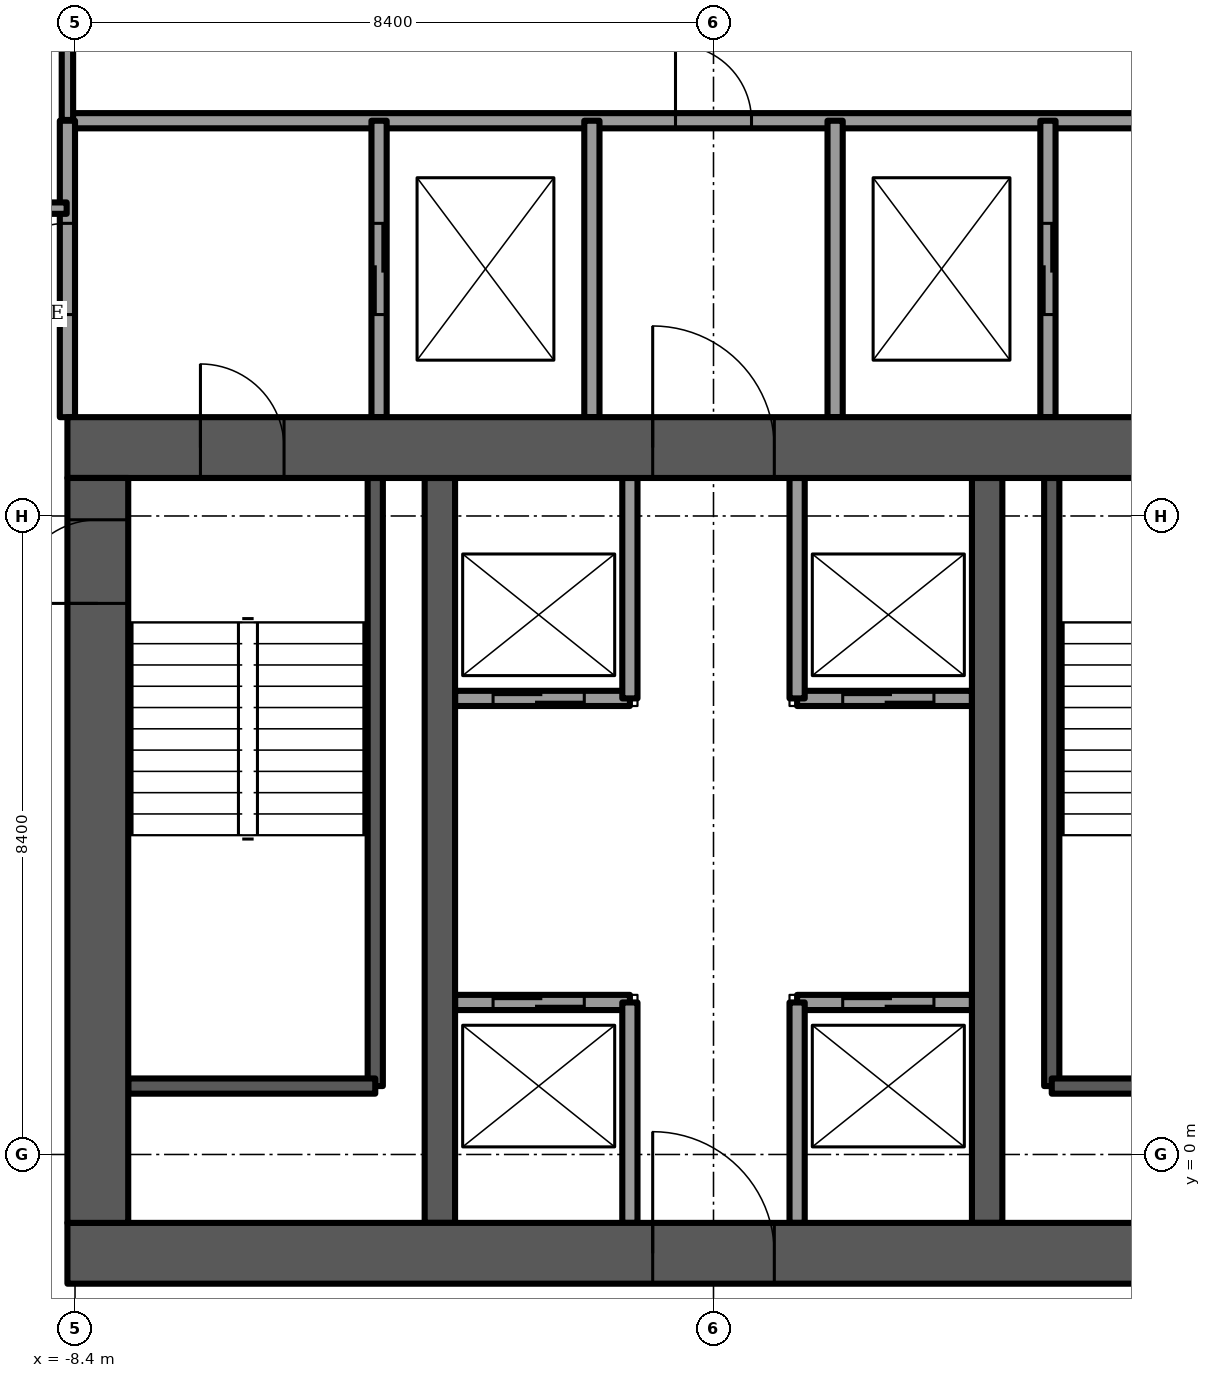
"""IFC4 building model, lengths in metres.
Left out: names, types, materials, properties, quantities, classifications, styles, units other than length and angle.
Written with IfcOpenShell. Run it as: python <this file> out.ifc"""

import sys

from ifc_helpers import new_model, si_unit, direction, frame, frame_2d, origin, place, context, subcontext, project, spatial, rectangle, extrude, element, fill, save


model = new_model("IFC4")
c1 = context("Model", 3, precision=1e-05, world=origin(), true_north=direction((0.0, 1.0)))
c2 = subcontext(c1, "Body", "Model", "MODEL_VIEW")
j1 = project(units=[si_unit("LENGTHUNIT", "METRE"), si_unit("PLANEANGLEUNIT", "RADIAN")], contexts=[c1])
p1 = place(None, origin())
s1 = spatial("IfcSite", under=j1, at=p1, CompositionType="ELEMENT")
p2 = place(p1, origin())
s2 = spatial("IfcBuilding", under=s1, at=p2, CompositionType="ELEMENT")
p3 = place(p2, frame((0.0, 0.0, 168.25)))
s3 = spatial("IfcBuildingStorey", under=s2, at=p3, CompositionType="ELEMENT", Elevation=168.25)
p4 = place(p3, frame((-8.5, -1.3, -0.3), z_axis=(0.0, 0.0, 1.0), x_axis=(1.0, 0.0, 0.0)))
e1 = element("IfcWall", 1, at=p4, inside=s3, PredefinedType="SHEAR", context=c2, shape_type="SweptSolid", body=[
    extrude(rectangle(XDim=17.0, YDim=0.8, at=frame_2d((8.5, 0.0))), origin(), (0.0, 0.0, 1.0), 3.75),
])
p5 = place(p4, frame((7.7, 0.0, 0.0)))
e2 = element("IfcOpeningElement", 2, at=p5, cuts=e1, PredefinedType="OPENING", context=c2, shape_type="SweptSolid", body=[
    extrude(rectangle(XDim=1.6, YDim=2.1, at=frame_2d((0.8, 1.05))), frame((0.0, 0.4, 0.0), z_axis=(0.0, -1.0, 0.0), x_axis=(1.0, 0.0, 0.0)), (0.0, 0.0, 1.0), 0.8),
])
p6 = place(p3, frame((-8.5, 9.3, -0.3), z_axis=(0.0, 0.0, 1.0), x_axis=(1.0, 0.0, 0.0)))
e3 = element("IfcWall", 3, at=p6, inside=s3, PredefinedType="SHEAR", context=c2, shape_type="SweptSolid", body=[
    extrude(rectangle(XDim=17.0, YDim=0.8, at=frame_2d((8.5, 0.0))), origin(), (0.0, 0.0, 1.0), 3.75),
])
p7 = place(p6, frame((7.7, 0.0, 0.0)))
e4 = element("IfcOpeningElement", 4, at=p7, cuts=e3, PredefinedType="OPENING", context=c2, shape_type="SweptSolid", body=[
    extrude(rectangle(XDim=1.6, YDim=2.1, at=frame_2d((0.8, 1.05))), frame((0.0, 0.4, 0.0), z_axis=(0.0, -1.0, 0.0), x_axis=(1.0, 0.0, 0.0)), (0.0, 0.0, 1.0), 0.8),
])
p8 = place(p6, frame((1.75, 0.0, 0.0)))
e5 = element("IfcOpeningElement", 5, at=p8, cuts=e3, PredefinedType="OPENING", context=c2, shape_type="SweptSolid", body=[
    extrude(rectangle(XDim=1.1, YDim=2.1, at=frame_2d((0.55, 1.05))), frame((0.0, 0.4, 0.0), z_axis=(0.0, -1.0, 0.0), x_axis=(1.0, 0.0, 0.0)), (0.0, 0.0, 1.0), 0.8),
])
p9 = place(p6, frame((14.15, 0.0, 0.0)))
e6 = element("IfcOpeningElement", 6, at=p9, cuts=e3, PredefinedType="OPENING", context=c2, shape_type="SweptSolid", body=[
    extrude(rectangle(XDim=1.1, YDim=2.1, at=frame_2d((0.55, 1.05))), frame((0.0, 0.4, 0.0), z_axis=(0.0, -1.0, 0.0), x_axis=(1.0, 0.0, 0.0)), (0.0, 0.0, 1.0), 0.8),
])
p10 = place(p3, frame((-8.1, -0.9, -0.3), z_axis=(0.0, 0.0, 1.0), x_axis=(0.0, 1.0, 0.0)))
e7 = element("IfcWall", 7, at=p10, inside=s3, PredefinedType="SHEAR", context=c2, shape_type="SweptSolid", body=[
    extrude(rectangle(XDim=9.8, YDim=0.8, at=frame_2d((4.9, 0.0))), origin(), (0.0, 0.0, 1.0), 3.75),
])
p11 = place(p10, frame((8.15, 0.0, 0.0)))
e8 = element("IfcOpeningElement", 8, at=p11, cuts=e7, PredefinedType="OPENING", context=c2, shape_type="SweptSolid", body=[
    extrude(rectangle(XDim=1.1, YDim=2.1, at=frame_2d((0.55, 1.05))), frame((0.0, 0.4, 0.0), z_axis=(0.0, -1.0, 0.0), x_axis=(1.0, 0.0, 0.0)), (0.0, 0.0, 1.0), 0.8),
])
for number, where, z_axis, x_axis in (
    (9, (-3.6, -0.9, -0.3), (0.0, 0.0, 1.0), (0.0, 1.0, 0.0)),
    (10, (3.6, -0.9, -0.3), (0.0, 0.0, 1.0), (0.0, 1.0, 0.0)),
):
    element("IfcWall", number, at=place(p3, frame(where, z_axis=z_axis, x_axis=x_axis)), inside=s3, PredefinedType="SHEAR", context=c2, shape_type="SweptSolid", body=[
        extrude(rectangle(XDim=9.8, YDim=0.4, at=frame_2d((4.9, 0.0))), origin(), (0.0, 0.0, 1.0), 3.75),
    ])
p12 = place(p3, frame((-7.393, 17.292, 0.0), z_axis=(0.0, 0.0, 1.0), x_axis=(-0.500001917853, -0.866024296509, 0.0)))
e11 = element("IfcWall", 11, at=p12, inside=s3, PredefinedType="SOLIDWALL", context=c2, shape_type="SweptSolid", body=[
    extrude(rectangle(XDim=19.788, YDim=0.15, at=frame_2d((9.894, 0.0))), origin(), (0.0, 0.0, 1.0), 3.45),
])
p13 = place(p12, frame((3.868, 0.0, 0.15)))
e12 = element("IfcOpeningElement", 12, at=p13, cuts=e11, PredefinedType="OPENING", context=c2, shape_type="SweptSolid", body=[
    extrude(rectangle(XDim=1.4, YDim=2.85, at=frame_2d((0.7, 1.425))), frame((0.0, 0.075, 0.0), z_axis=(0.0, -1.0, 0.0), x_axis=(1.0, 0.0, 0.0)), (0.0, 0.0, 1.0), 0.15),
])
p14 = place(p12, frame((10.067, 0.0, 0.15)))
e13 = element("IfcOpeningElement", 13, at=p14, cuts=e11, PredefinedType="OPENING", context=c2, shape_type="SweptSolid", body=[
    extrude(rectangle(XDim=0.9, YDim=2.85, at=frame_2d((0.45, 1.425))), frame((0.0, 0.075, 0.0), z_axis=(0.0, -1.0, 0.0), x_axis=(1.0, 0.0, 0.0)), (0.0, 0.0, 1.0), 0.15),
])
p15 = place(p12, frame((7.967, 0.0, 0.15)))
e14 = element("IfcOpeningElement", 14, at=p15, cuts=e11, PredefinedType="OPENING", context=c2, shape_type="SweptSolid", body=[
    extrude(rectangle(XDim=1.4, YDim=2.85, at=frame_2d((0.7, 1.425))), frame((0.0, 0.075, 0.0), z_axis=(0.0, -1.0, 0.0), x_axis=(1.0, 0.0, 0.0)), (0.0, 0.0, 1.0), 0.15),
])
p16 = place(p12, frame((13.779, 0.0, 0.0)))
e15 = element("IfcOpeningElement", 15, at=p16, cuts=e11, PredefinedType="OPENING", context=c2, shape_type="SweptSolid", body=[
    extrude(rectangle(XDim=1.4, YDim=2.4, at=frame_2d((0.7, 1.2))), frame((0.0, 0.075, 0.0), z_axis=(0.0, -1.0, 0.0), x_axis=(1.0, 0.0, 0.0)), (0.0, 0.0, 1.0), 0.15),
])
p17 = place(p12, frame((17.979, 0.0, 0.0)))
e16 = element("IfcOpeningElement", 16, at=p17, cuts=e11, PredefinedType="OPENING", context=c2, shape_type="SweptSolid", body=[
    extrude(rectangle(XDim=1.4, YDim=2.4, at=frame_2d((0.7, 1.2))), frame((0.0, 0.075, 0.0), z_axis=(0.0, -1.0, 0.0), x_axis=(1.0, 0.0, 0.0)), (0.0, 0.0, 1.0), 0.15),
])
p18 = place(p12, frame((0.168, 0.0, 0.15)))
e17 = element("IfcOpeningElement", 17, at=p18, cuts=e11, PredefinedType="OPENING", context=c2, shape_type="SweptSolid", body=[
    extrude(rectangle(XDim=1.6, YDim=2.73, at=frame_2d((0.8, 1.365))), frame((0.0, 0.075, 0.0), z_axis=(0.0, -1.0, 0.0), x_axis=(1.0, 0.0, 0.0)), (0.0, 0.0, 1.0), 0.15),
])
p19 = place(p3, frame((-3.4, 2.0, 0.0), z_axis=(0.0, 0.0, 1.0), x_axis=(1.0, 0.0, 0.0)))
e18 = element("IfcWall", 18, at=p19, inside=s3, PredefinedType="PARTITIONING", context=c2, shape_type="SweptSolid", body=[
    extrude(rectangle(XDim=2.3, YDim=0.2, at=frame_2d((1.15, 0.0))), origin(), (0.0, 0.0, 1.0), 3.45),
])
p20 = place(p19, frame((0.5, 0.0, 0.0)))
e19 = element("IfcOpeningElement", 19, at=p20, cuts=e18, PredefinedType="OPENING", context=c2, shape_type="SweptSolid", body=[
    extrude(rectangle(XDim=1.2, YDim=2.1, at=frame_2d((0.6, 1.05))), frame((0.0, 0.1, 0.0), z_axis=(0.0, -1.0, 0.0), x_axis=(1.0, 0.0, 0.0)), (0.0, 0.0, 1.0), 0.2),
])
p21 = place(p3, frame((-3.4, 6.0, 0.0), z_axis=(0.0, 0.0, 1.0), x_axis=(1.0, 0.0, 0.0)))
e20 = element("IfcWall", 20, at=p21, inside=s3, PredefinedType="PARTITIONING", context=c2, shape_type="SweptSolid", body=[
    extrude(rectangle(XDim=2.3, YDim=0.2, at=frame_2d((1.15, 0.0))), origin(), (0.0, 0.0, 1.0), 3.45),
])
p22 = place(p21, frame((0.5, 0.0, 0.0)))
e21 = element("IfcOpeningElement", 21, at=p22, cuts=e20, PredefinedType="OPENING", context=c2, shape_type="SweptSolid", body=[
    extrude(rectangle(XDim=1.2, YDim=2.1, at=frame_2d((0.6, 1.05))), frame((0.0, 0.1, 0.0), z_axis=(0.0, -1.0, 0.0), x_axis=(1.0, 0.0, 0.0)), (0.0, 0.0, 1.0), 0.2),
])
p23 = place(p3, frame((1.1, 2.0, 0.0), z_axis=(0.0, 0.0, 1.0), x_axis=(1.0, 0.0, 0.0)))
e22 = element("IfcWall", 22, at=p23, inside=s3, PredefinedType="PARTITIONING", context=c2, shape_type="SweptSolid", body=[
    extrude(rectangle(XDim=2.3, YDim=0.2, at=frame_2d((1.15, 0.0))), origin(), (0.0, 0.0, 1.0), 3.45),
])
p24 = place(p23, frame((0.6, 0.0, 0.0)))
e23 = element("IfcOpeningElement", 23, at=p24, cuts=e22, PredefinedType="OPENING", context=c2, shape_type="SweptSolid", body=[
    extrude(rectangle(XDim=1.2, YDim=2.1, at=frame_2d((0.6, 1.05))), frame((0.0, 0.1, 0.0), z_axis=(0.0, -1.0, 0.0), x_axis=(1.0, 0.0, 0.0)), (0.0, 0.0, 1.0), 0.2),
])
p25 = place(p3, frame((1.1, 6.0, 0.0), z_axis=(0.0, 0.0, 1.0), x_axis=(1.0, 0.0, 0.0)))
e24 = element("IfcWall", 24, at=p25, inside=s3, PredefinedType="PARTITIONING", context=c2, shape_type="SweptSolid", body=[
    extrude(rectangle(XDim=2.3, YDim=0.2, at=frame_2d((1.15, 0.0))), origin(), (0.0, 0.0, 1.0), 3.45),
])
p26 = place(p25, frame((0.6, 0.0, 0.0)))
e25 = element("IfcOpeningElement", 25, at=p26, cuts=e24, PredefinedType="OPENING", context=c2, shape_type="SweptSolid", body=[
    extrude(rectangle(XDim=1.2, YDim=2.1, at=frame_2d((0.6, 1.05))), frame((0.0, 0.1, 0.0), z_axis=(0.0, -1.0, 0.0), x_axis=(1.0, 0.0, 0.0)), (0.0, 0.0, 1.0), 0.2),
])
for number, where, z_axis, x_axis in (
    (26, (-1.1, -0.9, 0.0), (0.0, 0.0, 1.0), (0.0, 1.0, 0.0)),
    (27, (1.1, -0.9, 0.0), (0.0, 0.0, 1.0), (0.0, 1.0, 0.0)),
    (28, (-1.1, 6.0, 0.0), (0.0, 0.0, 1.0), (0.0, 1.0, 0.0)),
    (29, (1.1, 6.0, 0.0), (0.0, 0.0, 1.0), (0.0, 1.0, 0.0)),
):
    element("IfcWall", number, at=place(p3, frame(where, z_axis=z_axis, x_axis=x_axis)), inside=s3, PredefinedType="PARTITIONING", context=c2, shape_type="SweptSolid", body=[
        extrude(rectangle(XDim=2.9, YDim=0.2, at=frame_2d((1.45, 0.0))), origin(), (0.0, 0.0, 1.0), 3.45),
    ])
p27 = place(p3, frame((-4.45, 0.9, -0.3), z_axis=(0.0, 0.0, 1.0), x_axis=(0.0, 1.0, 0.0)))
e30 = element("IfcWall", 30, at=p27, inside=s3, PredefinedType="SOLIDWALL", context=c2, shape_type="SweptSolid", body=[
    extrude(rectangle(XDim=8.0, YDim=0.2, at=frame_2d((4.0, 0.0))), origin(), (0.0, 0.0, 1.0), 3.75),
])
p28 = place(p3, frame((-7.7, 0.9, -0.3), z_axis=(0.0, 0.0, 1.0), x_axis=(1.0, 0.0, 0.0)))
e31 = element("IfcWall", 31, at=p28, inside=s3, PredefinedType="SOLIDWALL", context=c2, shape_type="SweptSolid", body=[
    extrude(rectangle(XDim=3.25, YDim=0.2, at=frame_2d((1.625, 0.0))), origin(), (0.0, 0.0, 1.0), 3.75),
])
p29 = place(p3, frame((4.45, 0.9, -0.3), z_axis=(0.0, 0.0, 1.0), x_axis=(0.0, 1.0, 0.0)))
e32 = element("IfcWall", 32, at=p29, inside=s3, PredefinedType="SOLIDWALL", context=c2, shape_type="SweptSolid", body=[
    extrude(rectangle(XDim=8.0, YDim=0.2, at=frame_2d((4.0, 0.0))), origin(), (0.0, 0.0, 1.0), 3.75),
])
p30 = place(p3, frame((4.45, 0.9, -0.3), z_axis=(0.0, 0.0, 1.0), x_axis=(1.0, 0.0, 0.0)))
e33 = element("IfcWall", 33, at=p30, inside=s3, PredefinedType="SOLIDWALL", context=c2, shape_type="SweptSolid", body=[
    extrude(rectangle(XDim=3.25, YDim=0.2, at=frame_2d((1.625, 0.0))), origin(), (0.0, 0.0, 1.0), 3.75),
])
p31 = place(p3, frame((-8.5, 13.6, 0.0), z_axis=(0.0, 0.0, 1.0), x_axis=(1.0, 0.0, 0.0)))
e34 = element("IfcWall", 34, at=p31, inside=s3, PredefinedType="PARTITIONING", context=c2, shape_type="SweptSolid", body=[
    extrude(rectangle(XDim=16.899, YDim=0.2, at=frame_2d((8.449, 0.0))), origin(), (0.0, 0.0, 1.0), 3.45),
])
p32 = place(p31, frame((8.0, 0.0, 0.0)))
e35 = element("IfcOpeningElement", 35, at=p32, cuts=e34, PredefinedType="OPENING", context=c2, shape_type="SweptSolid", body=[
    extrude(rectangle(XDim=1.0, YDim=2.1, at=frame_2d((0.5, 1.05))), frame((0.0, 0.1, 0.0), z_axis=(0.0, -1.0, 0.0), x_axis=(1.0, 0.0, 0.0)), (0.0, 0.0, 1.0), 0.2),
])
p33 = place(p3, frame((-8.5, 9.7, 0.0), z_axis=(0.0, 0.0, 1.0), x_axis=(0.0, 1.0, 0.0)))
e36 = element("IfcWall", 36, at=p33, inside=s3, PredefinedType="PARTITIONING", context=c2, shape_type="SweptSolid", body=[
    extrude(rectangle(XDim=3.9, YDim=0.2, at=frame_2d((1.95, 0.0))), origin(), (0.0, 0.0, 1.0), 3.45),
])
p34 = place(p33, frame((1.35, 0.0, 0.0)))
e37 = element("IfcOpeningElement", 37, at=p34, cuts=e36, PredefinedType="OPENING", context=c2, shape_type="SweptSolid", body=[
    extrude(rectangle(XDim=1.2, YDim=2.1, at=frame_2d((0.6, 1.05))), frame((0.0, 0.1, 0.0), z_axis=(0.0, -1.0, 0.0), x_axis=(1.0, 0.0, 0.0)), (0.0, 0.0, 1.0), 0.2),
])
p35 = place(p3, frame((-4.4, 9.7, 0.0), z_axis=(0.0, 0.0, 1.0), x_axis=(0.0, 1.0, 0.0)))
e38 = element("IfcWall", 38, at=p35, inside=s3, PredefinedType="PARTITIONING", context=c2, shape_type="SweptSolid", body=[
    extrude(rectangle(XDim=3.9, YDim=0.2, at=frame_2d((1.95, 0.0))), origin(), (0.0, 0.0, 1.0), 3.45),
])
p36 = place(p35, frame((1.35, 0.0, 0.0)))
e39 = element("IfcOpeningElement", 39, at=p36, cuts=e38, PredefinedType="OPENING", context=c2, shape_type="SweptSolid", body=[
    extrude(rectangle(XDim=1.2, YDim=2.1, at=frame_2d((0.6, 1.05))), frame((0.0, 0.1, 0.0), z_axis=(0.0, -1.0, 0.0), x_axis=(1.0, 0.0, 0.0)), (0.0, 0.0, 1.0), 0.2),
])
p37 = place(p3, frame((4.4, 9.7, 0.0), z_axis=(0.0, 0.0, 1.0), x_axis=(0.0, 1.0, 0.0)))
e40 = element("IfcWall", 40, at=p37, inside=s3, PredefinedType="PARTITIONING", context=c2, shape_type="SweptSolid", body=[
    extrude(rectangle(XDim=3.9, YDim=0.2, at=frame_2d((1.95, 0.0))), origin(), (0.0, 0.0, 1.0), 3.45),
])
p38 = place(p37, frame((1.35, 0.0, 0.0)))
e41 = element("IfcOpeningElement", 41, at=p38, cuts=e40, PredefinedType="OPENING", context=c2, shape_type="SweptSolid", body=[
    extrude(rectangle(XDim=1.2, YDim=2.1, at=frame_2d((0.6, 1.05))), frame((0.0, 0.1, 0.0), z_axis=(0.0, -1.0, 0.0), x_axis=(1.0, 0.0, 0.0)), (0.0, 0.0, 1.0), 0.2),
])
for number, where, z_axis, x_axis in (
    (42, (-1.6, 9.7, 0.0), (0.0, 0.0, 1.0), (0.0, 1.0, 0.0)),
    (43, (1.6, 9.7, 0.0), (0.0, 0.0, 1.0), (0.0, 1.0, 0.0)),
):
    element("IfcWall", number, at=place(p3, frame(where, z_axis=z_axis, x_axis=x_axis)), inside=s3, PredefinedType="PARTITIONING", context=c2, shape_type="SweptSolid", body=[
        extrude(rectangle(XDim=3.9, YDim=0.2, at=frame_2d((1.95, 0.0))), origin(), (0.0, 0.0, 1.0), 3.45),
    ])
p39 = place(p3, frame((-10.241, 12.45, 0.0), z_axis=(0.0, 0.0, 1.0), x_axis=(1.0, 0.0, 0.0)))
e44 = element("IfcWall", 44, at=p39, inside=s3, PredefinedType="PARTITIONING", context=c2, shape_type="SweptSolid", body=[
    extrude(rectangle(XDim=1.731, YDim=0.15, at=frame_2d((0.865, 0.0))), origin(), (0.0, 0.0, 1.0), 3.45),
])
p40 = place(p3, frame((-8.5, 13.61, 0.0), z_axis=(0.0, 0.0, 1.0), x_axis=(0.0, 1.0, 0.0)))
e45 = element("IfcWall", 45, at=p40, inside=s3, PredefinedType="PARTITIONING", context=c2, shape_type="SweptSolid", body=[
    extrude(rectangle(XDim=1.855, YDim=0.15, at=frame_2d((0.927, 0.0))), origin(), (0.0, 0.0, 1.0), 3.45),
])
p41 = place(p20, origin())
e46 = element("IfcDoor", 46, at=p41, inside=s3, OperationType="SLIDING_TO_LEFT", PredefinedType="DOOR", context=c2, shape_type="SweptSolid", body=[
    extrude(rectangle(XDim=1.2, YDim=2.1, at=frame_2d((0.6, 1.05))), frame((0.0, 0.025, 0.0), z_axis=(0.0, -1.0, 0.0), x_axis=(1.0, 0.0, 0.0)), (0.0, 0.0, 1.0), 0.05),
])
fill(e19, e46)
p42 = place(p24, origin())
e47 = element("IfcDoor", 47, at=p42, inside=s3, OperationType="SLIDING_TO_LEFT", PredefinedType="DOOR", context=c2, shape_type="SweptSolid", body=[
    extrude(rectangle(XDim=1.2, YDim=2.1, at=frame_2d((0.6, 1.05))), frame((0.0, 0.025, 0.0), z_axis=(0.0, -1.0, 0.0), x_axis=(1.0, 0.0, 0.0)), (0.0, 0.0, 1.0), 0.05),
])
fill(e23, e47)
p43 = place(p22, origin())
e48 = element("IfcDoor", 48, at=p43, inside=s3, OperationType="SLIDING_TO_LEFT", PredefinedType="DOOR", context=c2, shape_type="SweptSolid", body=[
    extrude(rectangle(XDim=1.2, YDim=2.1, at=frame_2d((0.6, 1.05))), frame((0.0, 0.025, 0.0), z_axis=(0.0, -1.0, 0.0), x_axis=(1.0, 0.0, 0.0)), (0.0, 0.0, 1.0), 0.05),
])
fill(e21, e48)
p44 = place(p26, origin())
e49 = element("IfcDoor", 49, at=p44, inside=s3, OperationType="SLIDING_TO_LEFT", PredefinedType="DOOR", context=c2, shape_type="SweptSolid", body=[
    extrude(rectangle(XDim=1.2, YDim=2.1, at=frame_2d((0.6, 1.05))), frame((0.0, 0.025, 0.0), z_axis=(0.0, -1.0, 0.0), x_axis=(1.0, 0.0, 0.0)), (0.0, 0.0, 1.0), 0.05),
])
fill(e25, e49)
p45 = place(p5, origin())
e50 = element("IfcDoor", 50, at=p45, inside=s3, OperationType="DOUBLE_DOOR_SINGLE_SWING", PredefinedType="DOOR", context=c2, shape_type="SweptSolid", body=[
    extrude(rectangle(XDim=1.6, YDim=2.1, at=frame_2d((0.8, 1.05))), frame((0.0, 0.025, 0.0), z_axis=(0.0, -1.0, 0.0), x_axis=(1.0, 0.0, 0.0)), (0.0, 0.0, 1.0), 0.05),
])
fill(e2, e50)
p46 = place(p7, origin())
e51 = element("IfcDoor", 51, at=p46, inside=s3, OperationType="DOUBLE_DOOR_SINGLE_SWING", PredefinedType="DOOR", context=c2, shape_type="SweptSolid", body=[
    extrude(rectangle(XDim=1.6, YDim=2.1, at=frame_2d((0.8, 1.05))), frame((0.0, 0.025, 0.0), z_axis=(0.0, -1.0, 0.0), x_axis=(1.0, 0.0, 0.0)), (0.0, 0.0, 1.0), 0.05),
])
fill(e4, e51)
p47 = place(p8, origin())
e52 = element("IfcDoor", 52, at=p47, inside=s3, OperationType="SINGLE_SWING_LEFT", PredefinedType="DOOR", context=c2, shape_type="SweptSolid", body=[
    extrude(rectangle(XDim=1.1, YDim=2.1, at=frame_2d((0.55, 1.05))), frame((0.0, 0.025, 0.0), z_axis=(0.0, -1.0, 0.0), x_axis=(1.0, 0.0, 0.0)), (0.0, 0.0, 1.0), 0.05),
])
fill(e5, e52)
p48 = place(p11, origin())
e53 = element("IfcDoor", 53, at=p48, inside=s3, OperationType="SINGLE_SWING_RIGHT", PredefinedType="DOOR", context=c2, shape_type="SweptSolid", body=[
    extrude(rectangle(XDim=1.1, YDim=2.1, at=frame_2d((0.55, 1.05))), frame((0.0, 0.025, 0.0), z_axis=(0.0, -1.0, 0.0), x_axis=(1.0, 0.0, 0.0)), (0.0, 0.0, 1.0), 0.05),
])
fill(e8, e53)
p49 = place(p36, origin())
e54 = element("IfcDoor", 54, at=p49, inside=s3, OperationType="SLIDING_TO_LEFT", PredefinedType="DOOR", context=c2, shape_type="SweptSolid", body=[
    extrude(rectangle(XDim=1.2, YDim=2.1, at=frame_2d((0.6, 1.05))), frame((0.0, 0.025, 0.0), z_axis=(0.0, -1.0, 0.0), x_axis=(1.0, 0.0, 0.0)), (0.0, 0.0, 1.0), 0.05),
])
fill(e39, e54)
p50 = place(p34, origin())
e55 = element("IfcDoor", 55, at=p50, inside=s3, OperationType="SINGLE_SWING_LEFT", PredefinedType="DOOR", context=c2, shape_type="SweptSolid", body=[
    extrude(rectangle(XDim=1.2, YDim=2.1, at=frame_2d((0.6, 1.05))), frame((0.0, 0.025, 0.0), z_axis=(0.0, -1.0, 0.0), x_axis=(1.0, 0.0, 0.0)), (0.0, 0.0, 1.0), 0.05),
])
fill(e37, e55)
p51 = place(p38, origin())
e56 = element("IfcDoor", 56, at=p51, inside=s3, OperationType="SLIDING_TO_LEFT", PredefinedType="DOOR", context=c2, shape_type="SweptSolid", body=[
    extrude(rectangle(XDim=1.2, YDim=2.1, at=frame_2d((0.6, 1.05))), frame((0.0, 0.025, 0.0), z_axis=(0.0, -1.0, 0.0), x_axis=(1.0, 0.0, 0.0)), (0.0, 0.0, 1.0), 0.05),
])
fill(e41, e56)
p52 = place(p32, origin())
e57 = element("IfcDoor", 57, at=p52, inside=s3, OperationType="SINGLE_SWING_LEFT", PredefinedType="DOOR", context=c2, shape_type="SweptSolid", body=[
    extrude(rectangle(XDim=1.0, YDim=2.1, at=frame_2d((0.5, 1.05))), frame((0.0, 0.025, 0.0), z_axis=(0.0, -1.0, 0.0), x_axis=(1.0, 0.0, 0.0)), (0.0, 0.0, 1.0), 0.05),
])
fill(e35, e57)
save(model, sys.argv[1])
